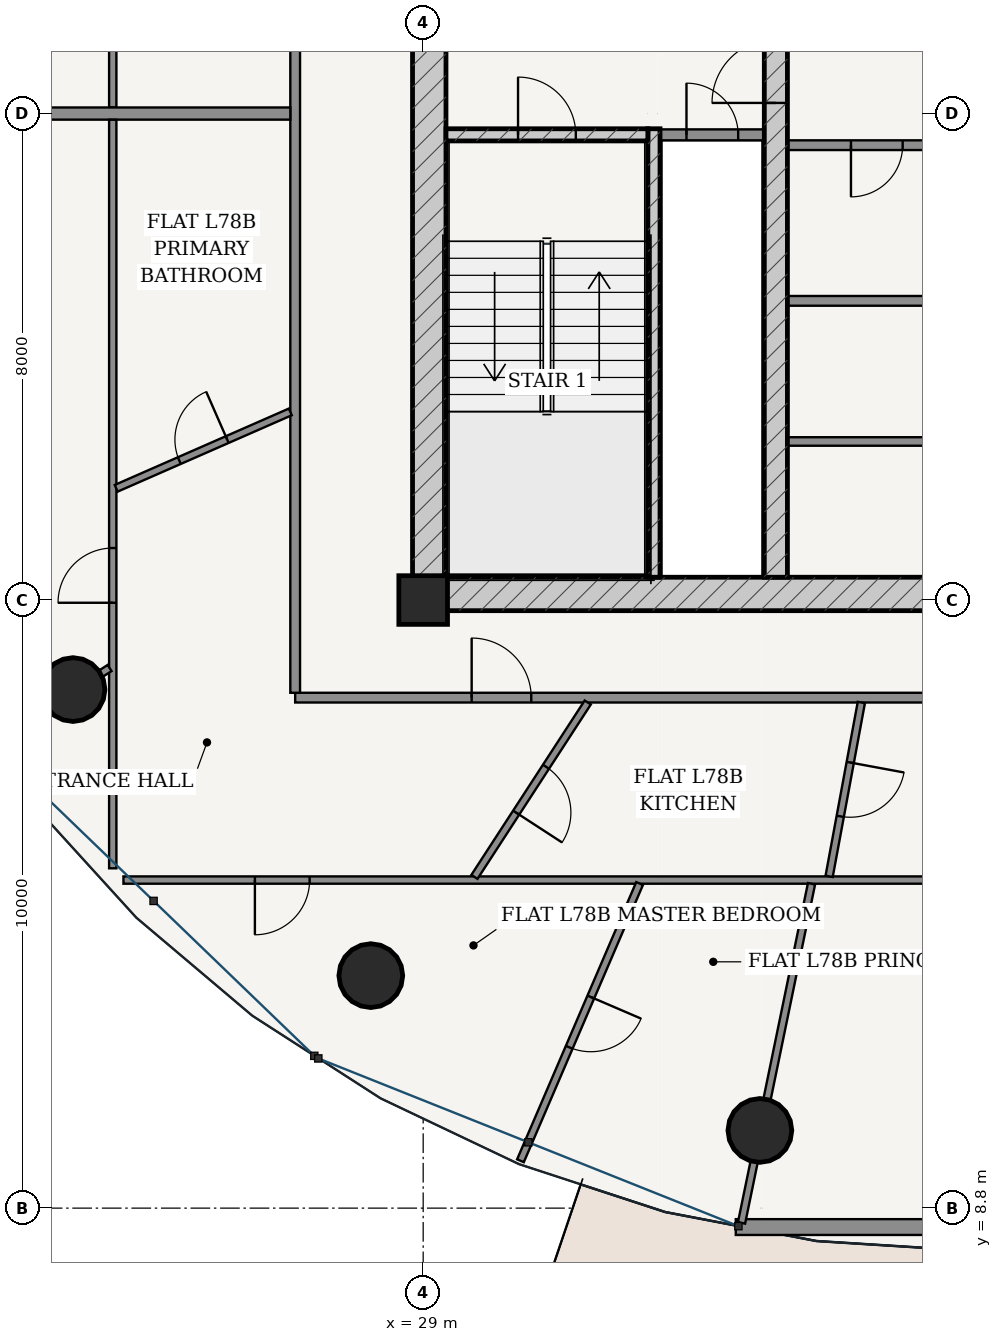
"""IFC4 building model, lengths in metres.
Left out: names, types, materials, properties, quantities, classifications, styles, units other than length and angle.
Written with IfcOpenShell. Run it as: python <this file> out.ifc"""

import sys

from ifc_helpers import new_model, si_unit, direction, frame, frame_2d, origin, origin_2d, place, context, subcontext, project, spatial, rectangle, hollow_circle, extrude, source, transform, mapped, element, fill, save


model = new_model("IFC4")
c1 = context("Model", 3, precision=1e-05, world=origin(), true_north=direction((-0.2419218956, 0.970295726276)))
c2 = subcontext(c1, "Body", "Model", "MODEL_VIEW")
j1 = project(units=[si_unit("LENGTHUNIT", "METRE"), si_unit("PLANEANGLEUNIT", "RADIAN")], contexts=[c1])
p1 = place(None, origin())
s1 = spatial("IfcSite", under=j1, at=p1, CompositionType="ELEMENT")
p2 = place(p1, origin())
s2 = spatial("IfcBuilding", under=s1, at=p2, CompositionType="ELEMENT")
p3 = place(p2, frame((0.0, 0.0, 296.95)))
s3 = spatial("IfcBuildingStorey", under=s2, at=p3, CompositionType="ELEMENT", Elevation=296.95)
p4 = place(p3, frame((29.0, 18.8, 0.0), z_axis=(0.0, 0.0, 1.0), x_axis=(1.0, 0.0, 0.0)))
e1 = element("IfcColumn", 1, at=p4, inside=s3, PredefinedType="COLUMN", context=c2, shape_type="SweptSolid", body=[
    extrude(rectangle(XDim=0.8, YDim=0.8, at=origin_2d()), origin(), (0.0, 0.0, 1.0), 3.75),
])
p5 = place(p3, frame((28.825, 18.9, 0.0), z_axis=(0.0, 0.0, 1.0), x_axis=(1.0, 0.0, 0.0)))
e2 = element("IfcWall", 2, at=p5, inside=s3, PredefinedType="SHEAR", context=c2, shape_type="SweptSolid", body=[
    extrude(rectangle(XDim=18.35, YDim=0.55, at=frame_2d((9.175, 0.0))), origin(), (0.0, 0.0, 1.0), 3.3),
])
p6 = place(p5, frame((8.75, 0.0, 0.0)))
e3 = element("IfcOpeningElement", 3, at=p6, cuts=e2, PredefinedType="OPENING", context=c2, shape_type="SweptSolid", body=[
    extrude(rectangle(XDim=0.85, YDim=2.1, at=frame_2d((0.425, 1.05))), frame((0.0, 0.285, 0.0), z_axis=(0.0, -1.0, 0.0), x_axis=(1.0, 0.0, 0.0)), (0.0, 0.0, 1.0), 0.57),
])
p7 = place(p3, frame((29.1, 19.175, 0.0), z_axis=(0.0, 0.0, 1.0), x_axis=(0.0, 1.0, 0.0)))
e4 = element("IfcWall", 4, at=p7, inside=s3, PredefinedType="SHEAR", context=c2, shape_type="SweptSolid", body=[
    extrude(rectangle(XDim=15.25, YDim=0.55, at=frame_2d((7.625, 0.0))), origin(), (0.0, 0.0, 1.0), 3.3),
])
p8 = place(p7, frame((9.875, 0.0, 0.0)))
e5 = element("IfcOpeningElement", 5, at=p8, cuts=e4, PredefinedType="OPENING", context=c2, shape_type="SweptSolid", body=[
    extrude(rectangle(XDim=1.5, YDim=2.2, at=frame_2d((0.75, 1.1))), frame((0.0, 0.285, 0.0), z_axis=(0.0, -1.0, 0.0), x_axis=(1.0, 0.0, 0.0)), (0.0, 0.0, 1.0), 0.57),
])
p9 = place(p3, frame((32.795, 19.175, 0.0), z_axis=(0.0, 0.0, 1.0), x_axis=(0.0, 1.0, 0.0)))
e6 = element("IfcWall", 6, at=p9, inside=s3, PredefinedType="SOLIDWALL", context=c2, shape_type="SweptSolid", body=[
    extrude(rectangle(XDim=7.375, YDim=0.2, at=frame_2d((3.688, 0.0))), origin(), (0.0, 0.0, 1.0), 3.3),
])
p10 = place(p3, frame((29.375, 26.45, 0.0), z_axis=(0.0, 0.0, 1.0), x_axis=(1.0, 0.0, 0.0)))
e7 = element("IfcWall", 7, at=p10, inside=s3, PredefinedType="SOLIDWALL", context=c2, shape_type="SweptSolid", body=[
    extrude(rectangle(XDim=3.32, YDim=0.2, at=frame_2d((1.66, 0.0))), origin(), (0.0, 0.0, 1.0), 3.3),
])
p11 = place(p10, frame((1.185, 0.0, 0.0)))
e8 = element("IfcOpeningElement", 8, at=p11, cuts=e7, PredefinedType="OPENING", context=c2, shape_type="SweptSolid", body=[
    extrude(rectangle(XDim=0.95, YDim=2.15, at=frame_2d((0.475, 1.075))), frame((0.0, 0.11, 0.0), z_axis=(0.0, -1.0, 0.0), x_axis=(1.0, 0.0, 0.0)), (0.0, 0.0, 1.0), 0.22),
])
p12 = place(p3, frame((34.8, 19.175, 0.0), z_axis=(0.0, 0.0, 1.0), x_axis=(0.0, 1.0, 0.0)))
e9 = element("IfcWall", 9, at=p12, inside=s3, PredefinedType="SHEAR", context=c2, shape_type="SweptSolid", body=[
    extrude(rectangle(XDim=15.25, YDim=0.38, at=frame_2d((7.625, 0.0))), origin(), (0.0, 0.0, 1.0), 3.3),
])
p13 = place(p12, frame((7.8, 0.0, 0.0)))
e10 = element("IfcOpeningElement", 10, at=p13, cuts=e9, PredefinedType="OPENING", context=c2, shape_type="SweptSolid", body=[
    extrude(rectangle(XDim=1.05, YDim=2.15, at=frame_2d((0.525, 1.075))), frame((0.0, 0.2, 0.0), z_axis=(0.0, -1.0, 0.0), x_axis=(1.0, 0.0, 0.0)), (0.0, 0.0, 1.0), 0.4),
])
for number, where, z_axis, x_axis in (
    (11, (23.241, 17.328, 0.0), (0.0, 0.0, 1.0), (1.0, 0.0, 0.0)),
    (12, (28.139, 12.624, 0.0), (0.0, 0.0, 1.0), (1.0, 0.0, 0.0)),
    (13, (34.537, 10.078, 0.0), (0.0, 0.0, 1.0), (1.0, 0.0, 0.0)),
):
    element("IfcColumn", number, at=place(p3, frame(where, z_axis=z_axis, x_axis=x_axis)), inside=s3, PredefinedType="COLUMN", context=c2, shape_type="SweptSolid", body=[
        extrude(hollow_circle(Radius=0.525, WallThickness=0.035, at=origin_2d()), origin(), (0.0, 0.0, 1.0), 3.75),
    ])
p14 = place(p3, frame((34.141, 8.489, 0.0), z_axis=(0.0, 0.0, 1.0), x_axis=(1.0, 0.0, 0.0)))
e14 = element("IfcWall", 14, at=p14, inside=s3, PredefinedType="SOLIDWALL", context=c2, shape_type="SweptSolid", body=[
    extrude(rectangle(XDim=7.718, YDim=0.26, at=frame_2d((3.859, 0.0))), origin(), (0.0, 0.0, 1.0), 3.3),
])
p15 = place(p14, frame((3.184, 0.0, 0.0)))
e15 = element("IfcOpeningElement", 15, at=p15, cuts=e14, PredefinedType="OPENING", context=c2, shape_type="SweptSolid", body=[
    extrude(rectangle(XDim=1.35, YDim=2.2, at=frame_2d((0.675, 1.1))), frame((0.0, 0.14, 0.0), z_axis=(0.0, -1.0, 0.0), x_axis=(1.0, 0.0, 0.0)), (0.0, 0.0, 1.0), 0.28),
])
p16 = place(p3, frame((32.9, 26.45, 0.0), z_axis=(0.0, 0.0, 1.0), x_axis=(1.0, 0.0, 0.0)))
e16 = element("IfcWall", 16, at=p16, inside=s3, PredefinedType="PARTITIONING", context=c2, shape_type="SweptSolid", body=[
    extrude(rectangle(XDim=1.71, YDim=0.18, at=frame_2d((0.855, 0.0))), origin(), (0.0, 0.0, 1.0), 3.3),
])
p17 = place(p16, frame((0.43, 0.0, 0.0)))
e17 = element("IfcOpeningElement", 17, at=p17, cuts=e16, PredefinedType="OPENING", context=c2, shape_type="SweptSolid", body=[
    extrude(rectangle(XDim=0.85, YDim=2.1, at=frame_2d((0.425, 1.05))), frame((0.0, 0.1, 0.0), z_axis=(0.0, -1.0, 0.0), x_axis=(1.0, 0.0, 0.0)), (0.0, 0.0, 1.0), 0.2),
])
p18 = place(p3, frame((34.99, 26.28, 0.0), z_axis=(0.0, 0.0, 1.0), x_axis=(1.0, 0.0, 0.0)))
e18 = element("IfcWall", 18, at=p18, inside=s3, PredefinedType="PARTITIONING", context=c2, shape_type="SweptSolid", body=[
    extrude(rectangle(XDim=6.02, YDim=0.16, at=frame_2d((3.01, 0.0))), origin(), (0.0, 0.0, 1.0), 3.3),
])
p19 = place(p18, frame((1.045, 0.0, 0.0)))
e19 = element("IfcOpeningElement", 19, at=p19, cuts=e18, PredefinedType="OPENING", context=c2, shape_type="SweptSolid", body=[
    extrude(rectangle(XDim=0.85, YDim=2.1, at=frame_2d((0.425, 1.05))), frame((0.0, 0.09, 0.0), z_axis=(0.0, -1.0, 0.0), x_axis=(1.0, 0.0, 0.0)), (0.0, 0.0, 1.0), 0.18),
])
p20 = place(p18, frame((3.215, 0.0, 0.0)))
e20 = element("IfcOpeningElement", 20, at=p20, cuts=e18, PredefinedType="OPENING", context=c2, shape_type="SweptSolid", body=[
    extrude(rectangle(XDim=1.1, YDim=2.2, at=frame_2d((0.55, 1.1))), frame((0.0, 0.09, 0.0), z_axis=(0.0, -1.0, 0.0), x_axis=(1.0, 0.0, 0.0)), (0.0, 0.0, 1.0), 0.18),
])
p21 = place(p18, frame((4.695, 0.0, 0.0)))
e21 = element("IfcOpeningElement", 21, at=p21, cuts=e18, PredefinedType="OPENING", context=c2, shape_type="SweptSolid", body=[
    extrude(rectangle(XDim=1.1, YDim=2.2, at=frame_2d((0.55, 1.1))), frame((0.0, 0.09, 0.0), z_axis=(0.0, -1.0, 0.0), x_axis=(1.0, 0.0, 0.0)), (0.0, 0.0, 1.0), 0.18),
])
p22 = place(p3, frame((34.99, 23.72, 0.0), z_axis=(0.0, 0.0, 1.0), x_axis=(1.0, 0.0, 0.0)))
e22 = element("IfcWall", 22, at=p22, inside=s3, PredefinedType="PARTITIONING", context=c2, shape_type="SweptSolid", body=[
    extrude(rectangle(XDim=6.02, YDim=0.16, at=frame_2d((3.01, 0.0))), origin(), (0.0, 0.0, 1.0), 3.3),
])
p23 = place(p3, frame((34.99, 21.407, 0.0), z_axis=(0.0, 0.0, 1.0), x_axis=(1.0, 0.0, 0.0)))
e23 = element("IfcWall", 23, at=p23, inside=s3, PredefinedType="PARTITIONING", context=c2, shape_type="SweptSolid", body=[
    extrude(rectangle(XDim=6.02, YDim=0.14, at=frame_2d((3.01, 0.0))), origin(), (0.0, 0.0, 1.0), 3.3),
])
p24 = place(p23, frame((2.585, 0.0, 0.0)))
e24 = element("IfcOpeningElement", 24, at=p24, cuts=e23, PredefinedType="OPENING", context=c2, shape_type="SweptSolid", body=[
    extrude(rectangle(XDim=0.85, YDim=2.1, at=frame_2d((0.425, 1.05))), frame((0.0, 0.08, 0.0), z_axis=(0.0, -1.0, 0.0), x_axis=(1.0, 0.0, 0.0)), (0.0, 0.0, 1.0), 0.16),
])
p25 = place(p3, frame((26.895, 17.195, 0.0), z_axis=(0.0, 0.0, 1.0), x_axis=(1.0, 0.0, 0.0)))
e25 = element("IfcWall", 25, at=p25, inside=s3, PredefinedType="PARTITIONING", context=c2, shape_type="SweptSolid", body=[
    extrude(rectangle(XDim=22.21, YDim=0.16, at=frame_2d((11.105, 0.0))), origin(), (0.0, 0.0, 1.0), 2.825),
])
p26 = place(p25, frame((2.902, 0.0, 0.0)))
e26 = element("IfcOpeningElement", 26, at=p26, cuts=e25, PredefinedType="OPENING", context=c2, shape_type="SweptSolid", body=[
    extrude(rectangle(XDim=0.98, YDim=2.2, at=frame_2d((0.49, 1.1))), frame((0.0, 0.09, 0.0), z_axis=(0.0, -1.0, 0.0), x_axis=(1.0, 0.0, 0.0)), (0.0, 0.0, 1.0), 0.18),
])
p27 = place(p3, frame((26.895, 17.275, 0.0), z_axis=(0.0, 0.0, 1.0), x_axis=(0.0, 1.0, 0.0)))
e27 = element("IfcWall", 27, at=p27, inside=s3, PredefinedType="PARTITIONING", context=c2, shape_type="SweptSolid", body=[
    extrude(rectangle(XDim=13.925, YDim=0.16, at=frame_2d((6.962, 0.0))), origin(), (0.0, 0.0, 1.0), 2.825),
])
p28 = place(p3, frame((23.895, 26.902, 0.0), z_axis=(0.0, 0.0, 1.0), x_axis=(0.0, 1.0, 0.0)))
e28 = element("IfcWall", 28, at=p28, inside=s3, PredefinedType="PARTITIONING", context=c2, shape_type="SweptSolid", body=[
    extrude(rectangle(XDim=7.378, YDim=0.12, at=frame_2d((3.689, 0.0))), origin(), (0.0, 0.0, 1.0), 2.825),
])
p29 = place(p28, frame((3.239, 0.0, 0.0)))
e29 = element("IfcOpeningElement", 29, at=p29, cuts=e28, PredefinedType="OPENING", context=c2, shape_type="SweptSolid", body=[
    extrude(rectangle(XDim=0.9, YDim=2.15, at=frame_2d((0.45, 1.075))), frame((0.0, 0.07, 0.0), z_axis=(0.0, -1.0, 0.0), x_axis=(1.0, 0.0, 0.0)), (0.0, 0.0, 1.0), 0.14),
])
p30 = place(p3, frame((26.815, 26.8, 0.0), z_axis=(0.0, 0.0, 1.0), x_axis=(-1.0, 0.0, 0.0)))
e30 = element("IfcWall", 30, at=p30, inside=s3, PredefinedType="PARTITIONING", context=c2, shape_type="SweptSolid", body=[
    extrude(rectangle(XDim=8.155, YDim=0.2, at=frame_2d((4.078, 0.0))), origin(), (0.0, 0.0, 1.0), 2.931),
])
p31 = place(p3, frame((51.929, 14.195, 0.0), z_axis=(0.0, 0.0, 1.0), x_axis=(-1.0, 0.0, 0.0)))
e31 = element("IfcWall", 31, at=p31, inside=s3, PredefinedType="PARTITIONING", context=c2, shape_type="SweptSolid", body=[
    extrude(rectangle(XDim=27.858, YDim=0.12, at=frame_2d((13.929, 0.0))), origin(), (0.0, 0.0, 1.0), 2.825),
])
p32 = place(p31, frame((24.797, 0.0, 0.0)))
e32 = element("IfcOpeningElement", 32, at=p32, cuts=e31, PredefinedType="OPENING", context=c2, shape_type="SweptSolid", body=[
    extrude(rectangle(XDim=0.9, YDim=2.15, at=frame_2d((0.45, 1.075))), frame((0.0, 0.07, 0.0), z_axis=(0.0, -1.0, 0.0), x_axis=(1.0, 0.0, 0.0)), (0.0, 0.0, 1.0), 0.14),
])
p33 = place(p31, frame((11.968, 0.0, 0.0)))
e33 = element("IfcOpeningElement", 33, at=p33, cuts=e31, PredefinedType="OPENING", context=c2, shape_type="SweptSolid", body=[
    extrude(rectangle(XDim=0.9, YDim=2.15, at=frame_2d((0.45, 1.075))), frame((0.0, 0.07, 0.0), z_axis=(0.0, -1.0, 0.0), x_axis=(1.0, 0.0, 0.0)), (0.0, 0.0, 1.0), 0.14),
])
p34 = place(p31, frame((5.092, 0.0, 0.0)))
e34 = element("IfcOpeningElement", 34, at=p34, cuts=e31, PredefinedType="OPENING", context=c2, shape_type="SweptSolid", body=[
    extrude(rectangle(XDim=0.9, YDim=2.15, at=frame_2d((0.45, 1.075))), frame((0.0, 0.07, 0.0), z_axis=(0.0, -1.0, 0.0), x_axis=(1.0, 0.0, 0.0)), (0.0, 0.0, 1.0), 0.14),
])
p35 = place(p3, frame((23.895, 14.388, 0.0), z_axis=(0.0, 0.0, 1.0), x_axis=(0.0, 1.0, 0.0)))
e35 = element("IfcWall", 35, at=p35, inside=s3, PredefinedType="PARTITIONING", context=c2, shape_type="SweptSolid", body=[
    extrude(rectangle(XDim=12.31, YDim=0.12, at=frame_2d((6.155, 0.0))), origin(), (0.0, 0.0, 1.0), 2.65),
])
p36 = place(p35, frame((4.367, 0.0, 0.0)))
e36 = element("IfcOpeningElement", 36, at=p36, cuts=e35, PredefinedType="OPENING", context=c2, shape_type="SweptSolid", body=[
    extrude(rectangle(XDim=0.9, YDim=2.15, at=frame_2d((0.45, 1.075))), frame((0.0, 0.07, 0.0), z_axis=(0.0, -1.0, 0.0), x_axis=(1.0, 0.0, 0.0)), (0.0, 0.0, 1.0), 0.14),
])
p37 = place(p3, frame((23.843, 17.682, 0.0), z_axis=(0.0, 0.0, 1.0), x_axis=(-0.840690872836, -0.541515333421, 0.0)))
e37 = element("IfcWall", 37, at=p37, inside=s3, PredefinedType="PARTITIONING", context=c2, shape_type="SweptSolid", body=[
    extrude(rectangle(XDim=2.247, YDim=0.12, at=frame_2d((1.123, 0.0))), origin(), (0.0, 0.0, 1.0), 2.65),
])
p38 = place(p3, frame((32.559, 14.138, 0.0), z_axis=(0.0, 0.0, 1.0), x_axis=(-0.394786072864, -0.918773071369, 0.0)))
e38 = element("IfcWall", 38, at=p38, inside=s3, PredefinedType="PARTITIONING", context=c2, shape_type="SweptSolid", body=[
    extrude(rectangle(XDim=4.962, YDim=0.12, at=frame_2d((2.481, 0.0))), origin(), (0.0, 0.0, 1.0), 2.931),
])
p39 = place(p38, frame((2.031, 0.0, 0.0)))
e39 = element("IfcOpeningElement", 39, at=p39, cuts=e38, PredefinedType="OPENING", context=c2, shape_type="SweptSolid", body=[
    extrude(rectangle(XDim=0.9, YDim=2.15, at=frame_2d((0.45, 1.075))), frame((0.0, 0.07, 0.0), z_axis=(0.0, -1.0, 0.0), x_axis=(1.0, 0.0, 0.0)), (0.0, 0.0, 1.0), 0.14),
])
p40 = place(p3, frame((35.386, 14.134, 0.0), z_axis=(0.0, 0.0, 1.0), x_axis=(-0.202089570669, -0.979367043262, 0.0)))
e40 = element("IfcWall", 40, at=p40, inside=s3, PredefinedType="PARTITIONING", context=c2, shape_type="SweptSolid", body=[
    extrude(rectangle(XDim=5.695, YDim=0.12, at=frame_2d((2.847, 0.0))), origin(), (0.0, 0.0, 1.0), 2.65),
])
p41 = place(p3, frame((26.815, 21.894, 0.0), z_axis=(0.0, 0.0, 1.0), x_axis=(-0.915755452884, -0.401736170284, 0.0)))
e41 = element("IfcWall", 41, at=p41, inside=s3, PredefinedType="PARTITIONING", context=c2, shape_type="SweptSolid", body=[
    extrude(rectangle(XDim=3.127, YDim=0.12, at=frame_2d((1.563, 0.0))), origin(), (0.0, 0.0, 1.0), 3.019),
])
p42 = place(p41, frame((1.133, 0.0, 0.0)))
e42 = element("IfcOpeningElement", 42, at=p42, cuts=e41, PredefinedType="OPENING", context=c2, shape_type="SweptSolid", body=[
    extrude(rectangle(XDim=0.86, YDim=2.15, at=frame_2d((0.43, 1.075))), frame((0.0, 0.07, 0.0), z_axis=(0.0, -1.0, 0.0), x_axis=(1.0, 0.0, 0.0)), (0.0, 0.0, 1.0), 0.14),
])
p43 = place(p3, frame((31.706, 17.115, 0.0), z_axis=(0.0, 0.0, 1.0), x_axis=(-0.544910571015, -0.838494167896, 0.0)))
e43 = element("IfcWall", 43, at=p43, inside=s3, PredefinedType="PARTITIONING", context=c2, shape_type="SweptSolid", body=[
    extrude(rectangle(XDim=3.42, YDim=0.12, at=frame_2d((1.71, 0.0))), origin(), (0.0, 0.0, 1.0), 3.019),
])
p44 = place(p43, frame((1.26, 0.0, 0.0)))
e44 = element("IfcOpeningElement", 44, at=p44, cuts=e43, PredefinedType="OPENING", context=c2, shape_type="SweptSolid", body=[
    extrude(rectangle(XDim=0.9, YDim=2.15, at=frame_2d((0.45, 1.075))), frame((0.0, 0.07, 0.0), z_axis=(0.0, -1.0, 0.0), x_axis=(1.0, 0.0, 0.0)), (0.0, 0.0, 1.0), 0.14),
])
p45 = place(p3, frame((36.206, 17.115, 0.0), z_axis=(0.0, 0.0, 1.0), x_axis=(-0.182194488266, -0.983262512479, 0.0)))
e45 = element("IfcWall", 45, at=p45, inside=s3, PredefinedType="PARTITIONING", context=c2, shape_type="SweptSolid", body=[
    extrude(rectangle(XDim=2.908, YDim=0.12, at=frame_2d((1.454, 0.0))), origin(), (0.0, 0.0, 1.0), 3.019),
])
p46 = place(p45, frame((1.004, 0.0, 0.0)))
e46 = element("IfcOpeningElement", 46, at=p46, cuts=e45, PredefinedType="OPENING", context=c2, shape_type="SweptSolid", body=[
    extrude(rectangle(XDim=0.9, YDim=2.15, at=frame_2d((0.45, 1.075))), frame((0.0, 0.07, 0.0), z_axis=(0.0, -1.0, 0.0), x_axis=(1.0, 0.0, 0.0)), (0.0, 0.0, 1.0), 0.14),
])
m1 = source(origin(), c2, "Body", "SweptSolid", [
    extrude(rectangle(XDim=1.05, YDim=2.15, at=frame_2d((0.525, 1.075))), frame((0.0, 0.025, 0.0), z_axis=(0.0, -1.0, 0.0), x_axis=(1.0, 0.0, 0.0)), (0.0, 0.0, 1.0), 0.05),
])
p47 = place(p13, origin())
e47 = element("IfcDoor", 47, at=p47, inside=s3, OperationType="SINGLE_SWING_LEFT", PredefinedType="DOOR", context=c2, shape_type="MappedRepresentation", body=[
    mapped(m1, transform((0.0, 0.0, 0.0), scale=1.0)),
])
fill(e10, e47)
m2 = source(origin(), c2, "Body", "SweptSolid", [
    extrude(rectangle(XDim=0.95, YDim=2.15, at=frame_2d((0.475, 1.075))), frame((0.0, 0.025, 0.0), z_axis=(0.0, -1.0, 0.0), x_axis=(1.0, 0.0, 0.0)), (0.0, 0.0, 1.0), 0.05),
])
p48 = place(p11, origin())
e48 = element("IfcDoor", 48, at=p48, inside=s3, OperationType="SINGLE_SWING_LEFT", PredefinedType="DOOR", context=c2, shape_type="MappedRepresentation", body=[
    mapped(m2, transform((0.0, 0.0, 0.0), scale=1.0)),
])
fill(e8, e48)
m3 = source(origin(), c2, "Body", "SweptSolid", [
    extrude(rectangle(XDim=0.85, YDim=2.1, at=frame_2d((0.425, 1.05))), frame((0.0, 0.025, 0.0), z_axis=(0.0, -1.0, 0.0), x_axis=(1.0, 0.0, 0.0)), (0.0, 0.0, 1.0), 0.05),
])
p49 = place(p17, origin())
e49 = element("IfcDoor", 49, at=p49, inside=s3, OperationType="SINGLE_SWING_LEFT", PredefinedType="DOOR", context=c2, shape_type="MappedRepresentation", body=[
    mapped(m3, transform((0.0, 0.0, 0.0), scale=1.0)),
])
fill(e17, e49)
p50 = place(p19, frame((0.85, 0.0, 0.0), z_axis=(0.0, 0.0, 1.0), x_axis=(-1.0, 0.0, 0.0)))
e50 = element("IfcDoor", 50, at=p50, inside=s3, OperationType="SINGLE_SWING_RIGHT", PredefinedType="DOOR", context=c2, shape_type="MappedRepresentation", body=[
    mapped(m3, transform((0.0, 0.0, 0.0), scale=1.0)),
])
fill(e19, e50)
m4 = source(origin(), c2, "Body", "SweptSolid", [
    extrude(rectangle(XDim=0.98, YDim=2.2, at=frame_2d((0.49, 1.1))), frame((0.0, 0.025, 0.0), z_axis=(0.0, -1.0, 0.0), x_axis=(1.0, 0.0, 0.0)), (0.0, 0.0, 1.0), 0.05),
])
p51 = place(p26, origin())
e51 = element("IfcDoor", 51, at=p51, inside=s3, OperationType="SINGLE_SWING_LEFT", PredefinedType="DOOR", context=c2, shape_type="MappedRepresentation", body=[
    mapped(m4, transform((0.0, 0.0, 0.0), scale=1.0)),
])
fill(e26, e51)
m5 = source(origin(), c2, "Body", "SweptSolid", [
    extrude(rectangle(XDim=0.86, YDim=2.15, at=frame_2d((0.43, 1.075))), frame((0.0, 0.025, 0.0), z_axis=(0.0, -1.0, 0.0), x_axis=(1.0, 0.0, 0.0)), (0.0, 0.0, 1.0), 0.05),
])
p52 = place(p42, frame((0.86, 0.0, 0.0), z_axis=(0.0, 0.0, 1.0), x_axis=(-1.0, 0.0, 0.0)))
e52 = element("IfcDoor", 52, at=p52, inside=s3, OperationType="SINGLE_SWING_RIGHT", PredefinedType="DOOR", context=c2, shape_type="MappedRepresentation", body=[
    mapped(m5, transform((0.0, 0.0, 0.0), scale=1.0)),
])
fill(e42, e52)
m6 = source(origin(), c2, "Body", "SweptSolid", [
    extrude(rectangle(XDim=0.9, YDim=2.15, at=frame_2d((0.45, 1.075))), frame((0.0, 0.025, 0.0), z_axis=(0.0, -1.0, 0.0), x_axis=(1.0, 0.0, 0.0)), (0.0, 0.0, 1.0), 0.05),
])
p53 = place(p36, origin())
e53 = element("IfcDoor", 53, at=p53, inside=s3, OperationType="SINGLE_SWING_LEFT", PredefinedType="DOOR", context=c2, shape_type="MappedRepresentation", body=[
    mapped(m6, transform((0.0, 0.0, 0.0), scale=1.0)),
])
fill(e36, e53)
p54 = place(p44, origin())
e54 = element("IfcDoor", 54, at=p54, inside=s3, OperationType="SINGLE_SWING_RIGHT", PredefinedType="DOOR", context=c2, shape_type="MappedRepresentation", body=[
    mapped(m6, transform((0.0, 0.0, 0.0), scale=1.0)),
])
fill(e44, e54)
p55 = place(p46, origin())
e55 = element("IfcDoor", 55, at=p55, inside=s3, OperationType="SINGLE_SWING_LEFT", PredefinedType="DOOR", context=c2, shape_type="MappedRepresentation", body=[
    mapped(m6, transform((0.0, 0.0, 0.0), scale=1.0)),
])
fill(e46, e55)
p56 = place(p32, origin())
e56 = element("IfcDoor", 56, at=p56, inside=s3, OperationType="SINGLE_SWING_RIGHT", PredefinedType="DOOR", context=c2, shape_type="MappedRepresentation", body=[
    mapped(m6, transform((0.0, 0.0, 0.0), scale=1.0)),
])
fill(e32, e56)
p57 = place(p39, origin())
e57 = element("IfcDoor", 57, at=p57, inside=s3, OperationType="SINGLE_SWING_LEFT", PredefinedType="DOOR", context=c2, shape_type="MappedRepresentation", body=[
    mapped(m6, transform((0.0, 0.0, 0.0), scale=1.0)),
])
fill(e39, e57)
save(model, sys.argv[1])
